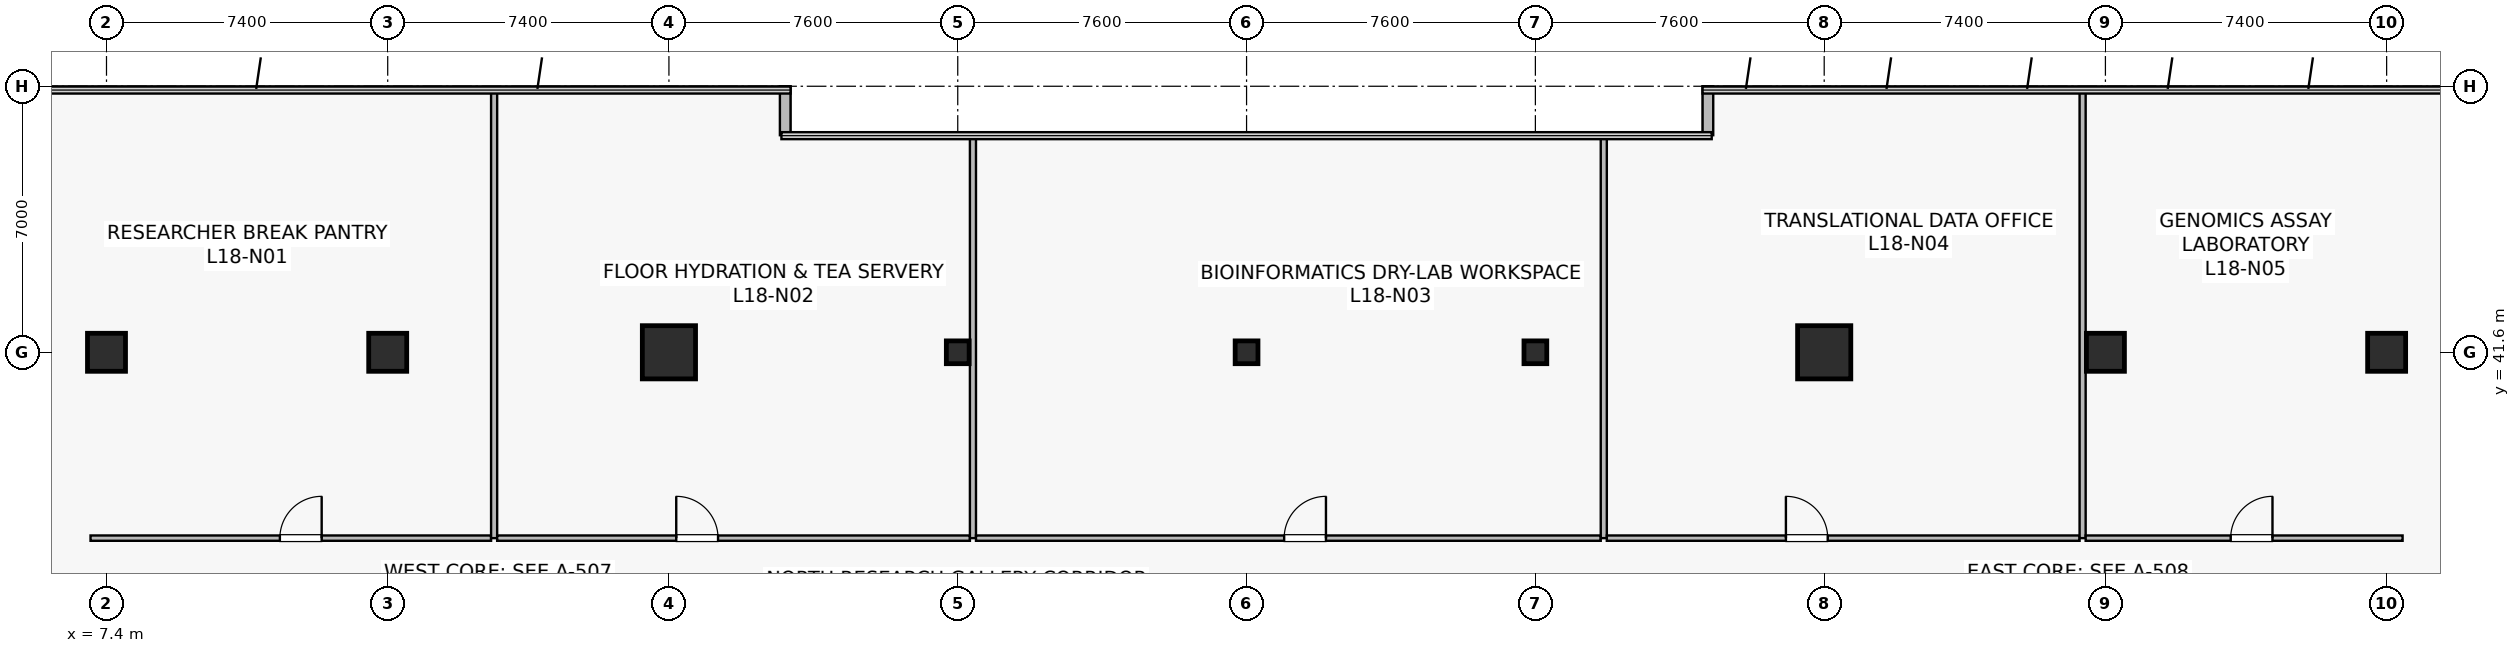
"""IFC4 building model, lengths in metres.
Left out: names, types, materials, properties, quantities, classifications, styles, units other than length and angle.
Written with IfcOpenShell. Run it as: python <this file> out.ifc"""

import sys

from ifc_helpers import new_model, si_unit, direction, frame, frame_2d, origin, origin_2d, place, context, subcontext, project, spatial, rectangle, hollow_rectangle, extrude, source, transform, mapped, element, fill, save


model = new_model("IFC4")
c1 = context("Model", 3, precision=1e-05, world=origin(), true_north=direction((0.0, 1.0)))
c2 = subcontext(c1, "Body", "Model", "MODEL_VIEW")
j1 = project(units=[si_unit("LENGTHUNIT", "METRE"), si_unit("PLANEANGLEUNIT", "RADIAN")], contexts=[c1])
p1 = place(None, origin())
s1 = spatial("IfcSite", under=j1, at=p1, CompositionType="ELEMENT")
p2 = place(p1, origin())
s2 = spatial("IfcBuilding", under=s1, at=p2, CompositionType="ELEMENT")
p3 = place(p2, frame((0.0, 0.0, 74.4)))
s3 = spatial("IfcBuildingStorey", under=s2, at=p3, CompositionType="ELEMENT", Elevation=74.4)
m1 = source(origin(), c2, "Body", "SweptSolid", [
    extrude(rectangle(XDim=1.0, YDim=1.0, at=origin_2d()), origin(), (0.0, 0.0, 1.0), 4.1),
])
p4 = place(p3, frame((14.8, 41.6, 0.0), z_axis=(0.0, 0.0, 1.0), x_axis=(1.0, 0.0, 0.0)))
e1 = element("IfcColumn", 1, at=p4, inside=s3, PredefinedType="COLUMN", context=c2, shape_type="MappedRepresentation", body=[
    mapped(m1, transform((0.0, 0.0, 0.0), scale=1.0)),
])
m2 = source(origin(), c2, "Body", "SweptSolid", [
    extrude(rectangle(XDim=1.4, YDim=1.4, at=origin_2d()), origin(), (0.0, 0.0, 1.0), 4.1),
])
for number, where, z_axis, x_axis in (
    (2, (22.2, 41.6, 0.0), (0.0, 0.0, 1.0), (1.0, 0.0, 0.0)),
    (3, (52.6, 41.6, 0.0), (0.0, 0.0, 1.0), (1.0, 0.0, 0.0)),
):
    element("IfcColumn", number, at=place(p3, frame(where, z_axis=z_axis, x_axis=x_axis)), inside=s3, PredefinedType="COLUMN", context=c2, shape_type="MappedRepresentation", body=[
        mapped(m2, transform((0.0, 0.0, 0.0), scale=1.0)),
    ])
for number, where, z_axis, x_axis in (
    (4, (60.0, 41.6, 0.0), (0.0, 0.0, 1.0), (1.0, 0.0, 0.0)),
    (5, (7.4, 41.6, 0.0), (0.0, 0.0, 1.0), (1.0, 0.0, 0.0)),
    (6, (67.4, 41.6, 0.0), (0.0, 0.0, 1.0), (1.0, 0.0, 0.0)),
):
    element("IfcColumn", number, at=place(p3, frame(where, z_axis=z_axis, x_axis=x_axis)), inside=s3, PredefinedType="COLUMN", context=c2, shape_type="MappedRepresentation", body=[
        mapped(m1, transform((0.0, 0.0, 0.0), scale=1.0)),
    ])
m3 = source(origin(), c2, "Body", "SweptSolid", [
    extrude(hollow_rectangle(XDim=0.6, YDim=0.6, WallThickness=0.028, at=origin_2d()), origin(), (0.0, 0.0, 1.0), 4.1),
])
for number, where, z_axis, x_axis in (
    (7, (29.8, 41.6, 0.0), (0.0, 0.0, 1.0), (1.0, 0.0, 0.0)),
    (8, (37.4, 41.6, 0.0), (0.0, 0.0, 1.0), (1.0, 0.0, 0.0)),
    (9, (45.0, 41.6, 0.0), (0.0, 0.0, 1.0), (1.0, 0.0, 0.0)),
):
    element("IfcColumn", number, at=place(p3, frame(where, z_axis=z_axis, x_axis=x_axis)), inside=s3, PredefinedType="COLUMN", context=c2, shape_type="MappedRepresentation", body=[
        mapped(m3, transform((0.0, 0.0, 0.0), scale=1.0)),
    ])
for number, where, z_axis, x_axis in (
    (10, (49.54, 48.6, 0.0), (0.0, 0.0, 1.0), (0.0, -1.0, 0.0)),
    (11, (25.26, 47.312, 0.0), (0.0, 0.0, 1.0), (0.0, 1.0, 0.0)),
):
    element("IfcWall", number, at=place(p3, frame(where, z_axis=z_axis, x_axis=x_axis)), inside=s3, PredefinedType="STANDARD", context=c2, shape_type="SweptSolid", body=[
        extrude(rectangle(XDim=1.288, YDim=0.28, at=frame_2d((0.644, 0.0))), origin(), (0.0, 0.0, 1.0), 3.78),
    ])
p5 = place(p3, frame((6.98, 36.71, 0.0), z_axis=(0.0, 0.0, 1.0), x_axis=(1.0, 0.0, 0.0)))
e12 = element("IfcWall", 12, at=p5, inside=s3, PredefinedType="PARTITIONING", context=c2, shape_type="SweptSolid", body=[
    extrude(rectangle(XDim=10.54, YDim=0.14, at=frame_2d((5.27, 0.0))), origin(), (0.0, 0.0, 1.0), 3.115),
])
p6 = place(p5, frame((4.982, 0.0, 0.0)))
e13 = element("IfcOpeningElement", 13, at=p6, cuts=e12, PredefinedType="OPENING", context=c2, shape_type="SweptSolid", body=[
    extrude(rectangle(XDim=1.1, YDim=2.18, at=frame_2d((0.55, 1.09))), frame((0.0, 0.08, 0.0), z_axis=(0.0, -1.0, 0.0), x_axis=(1.0, 0.0, 0.0)), (0.0, 0.0, 1.0), 0.16),
])
p7 = place(p3, frame((17.6, 36.71, 0.0), z_axis=(0.0, 0.0, 1.0), x_axis=(0.0, 1.0, 0.0)))
e14 = element("IfcWall", 14, at=p7, inside=s3, PredefinedType="PARTITIONING", context=c2, shape_type="SweptSolid", body=[
    extrude(rectangle(XDim=11.78, YDim=0.16, at=frame_2d((5.89, 0.0))), origin(), (0.0, 0.0, 1.0), 3.015),
])
p8 = place(p3, frame((17.68, 36.71, 0.0), z_axis=(0.0, 0.0, 1.0), x_axis=(1.0, 0.0, 0.0)))
e15 = element("IfcWall", 15, at=p8, inside=s3, PredefinedType="PARTITIONING", context=c2, shape_type="SweptSolid", body=[
    extrude(rectangle(XDim=12.44, YDim=0.14, at=frame_2d((6.22, 0.0))), origin(), (0.0, 0.0, 1.0), 3.115),
])
p9 = place(p8, frame((4.712, 0.0, 0.0)))
e16 = element("IfcOpeningElement", 16, at=p9, cuts=e15, PredefinedType="OPENING", context=c2, shape_type="SweptSolid", body=[
    extrude(rectangle(XDim=1.1, YDim=2.18, at=frame_2d((0.55, 1.09))), frame((0.0, 0.08, 0.0), z_axis=(0.0, -1.0, 0.0), x_axis=(1.0, 0.0, 0.0)), (0.0, 0.0, 1.0), 0.16),
])
p10 = place(p3, frame((30.2, 36.71, 0.0), z_axis=(0.0, 0.0, 1.0), x_axis=(0.0, 1.0, 0.0)))
e17 = element("IfcWall", 17, at=p10, inside=s3, PredefinedType="PARTITIONING", context=c2, shape_type="SweptSolid", body=[
    extrude(rectangle(XDim=10.58, YDim=0.16, at=frame_2d((5.29, 0.0))), origin(), (0.0, 0.0, 1.0), 3.015),
])
p11 = place(p3, frame((30.28, 36.71, 0.0), z_axis=(0.0, 0.0, 1.0), x_axis=(1.0, 0.0, 0.0)))
e18 = element("IfcWall", 18, at=p11, inside=s3, PredefinedType="PARTITIONING", context=c2, shape_type="SweptSolid", body=[
    extrude(rectangle(XDim=16.44, YDim=0.14, at=frame_2d((8.22, 0.0))), origin(), (0.0, 0.0, 1.0), 3.115),
])
p12 = place(p11, frame((8.109, 0.0, 0.0)))
e19 = element("IfcOpeningElement", 19, at=p12, cuts=e18, PredefinedType="OPENING", context=c2, shape_type="SweptSolid", body=[
    extrude(rectangle(XDim=1.1, YDim=2.18, at=frame_2d((0.55, 1.09))), frame((0.0, 0.08, 0.0), z_axis=(0.0, -1.0, 0.0), x_axis=(1.0, 0.0, 0.0)), (0.0, 0.0, 1.0), 0.16),
])
p13 = place(p3, frame((46.8, 36.71, 0.0), z_axis=(0.0, 0.0, 1.0), x_axis=(0.0, 1.0, 0.0)))
e20 = element("IfcWall", 20, at=p13, inside=s3, PredefinedType="PARTITIONING", context=c2, shape_type="SweptSolid", body=[
    extrude(rectangle(XDim=10.58, YDim=0.16, at=frame_2d((5.29, 0.0))), origin(), (0.0, 0.0, 1.0), 3.015),
])
p14 = place(p3, frame((46.88, 36.71, 0.0), z_axis=(0.0, 0.0, 1.0), x_axis=(1.0, 0.0, 0.0)))
e21 = element("IfcWall", 21, at=p14, inside=s3, PredefinedType="PARTITIONING", context=c2, shape_type="SweptSolid", body=[
    extrude(rectangle(XDim=12.44, YDim=0.14, at=frame_2d((6.22, 0.0))), origin(), (0.0, 0.0, 1.0), 3.115),
])
p15 = place(p14, frame((4.712, 0.0, 0.0)))
e22 = element("IfcOpeningElement", 22, at=p15, cuts=e21, PredefinedType="OPENING", context=c2, shape_type="SweptSolid", body=[
    extrude(rectangle(XDim=1.1, YDim=2.18, at=frame_2d((0.55, 1.09))), frame((0.0, 0.08, 0.0), z_axis=(0.0, -1.0, 0.0), x_axis=(1.0, 0.0, 0.0)), (0.0, 0.0, 1.0), 0.16),
])
p16 = place(p3, frame((59.4, 36.71, 0.0), z_axis=(0.0, 0.0, 1.0), x_axis=(0.0, 1.0, 0.0)))
e23 = element("IfcWall", 23, at=p16, inside=s3, PredefinedType="PARTITIONING", context=c2, shape_type="SweptSolid", body=[
    extrude(rectangle(XDim=11.78, YDim=0.16, at=frame_2d((5.89, 0.0))), origin(), (0.0, 0.0, 1.0), 3.015),
])
p17 = place(p3, frame((59.48, 36.71, 0.0), z_axis=(0.0, 0.0, 1.0), x_axis=(1.0, 0.0, 0.0)))
e24 = element("IfcWall", 24, at=p17, inside=s3, PredefinedType="PARTITIONING", context=c2, shape_type="SweptSolid", body=[
    extrude(rectangle(XDim=8.34, YDim=0.14, at=frame_2d((4.17, 0.0))), origin(), (0.0, 0.0, 1.0), 3.115),
])
p18 = place(p17, frame((3.816, 0.0, 0.0)))
e25 = element("IfcOpeningElement", 25, at=p18, cuts=e24, PredefinedType="OPENING", context=c2, shape_type="SweptSolid", body=[
    extrude(rectangle(XDim=1.1, YDim=2.18, at=frame_2d((0.55, 1.09))), frame((0.0, 0.08, 0.0), z_axis=(0.0, -1.0, 0.0), x_axis=(1.0, 0.0, 0.0)), (0.0, 0.0, 1.0), 0.16),
])
m4 = source(origin(), c2, "Body", "SweptSolid", [
    extrude(rectangle(XDim=1.1, YDim=2.18, at=frame_2d((0.55, 1.09))), frame((0.0, 0.025, 0.0), z_axis=(0.0, -1.0, 0.0), x_axis=(1.0, 0.0, 0.0)), (0.0, 0.0, 1.0), 0.05),
])
p19 = place(p6, origin())
e26 = element("IfcDoor", 26, at=p19, inside=s3, OperationType="SINGLE_SWING_RIGHT", PredefinedType="DOOR", context=c2, shape_type="MappedRepresentation", body=[
    mapped(m4, transform((0.0, 0.0, 0.0), scale=1.0)),
])
fill(e13, e26)
p20 = place(p9, origin())
e27 = element("IfcDoor", 27, at=p20, inside=s3, OperationType="SINGLE_SWING_LEFT", PredefinedType="DOOR", context=c2, shape_type="MappedRepresentation", body=[
    mapped(m4, transform((0.0, 0.0, 0.0), scale=1.0)),
])
fill(e16, e27)
p21 = place(p12, origin())
e28 = element("IfcDoor", 28, at=p21, inside=s3, OperationType="SINGLE_SWING_RIGHT", PredefinedType="DOOR", context=c2, shape_type="MappedRepresentation", body=[
    mapped(m4, transform((0.0, 0.0, 0.0), scale=1.0)),
])
fill(e19, e28)
p22 = place(p15, origin())
e29 = element("IfcDoor", 29, at=p22, inside=s3, OperationType="SINGLE_SWING_LEFT", PredefinedType="DOOR", context=c2, shape_type="MappedRepresentation", body=[
    mapped(m4, transform((0.0, 0.0, 0.0), scale=1.0)),
])
fill(e22, e29)
p23 = place(p18, origin())
e30 = element("IfcDoor", 30, at=p23, inside=s3, OperationType="SINGLE_SWING_RIGHT", PredefinedType="DOOR", context=c2, shape_type="MappedRepresentation", body=[
    mapped(m4, transform((0.0, 0.0, 0.0), scale=1.0)),
])
fill(e25, e30)
save(model, sys.argv[1])
